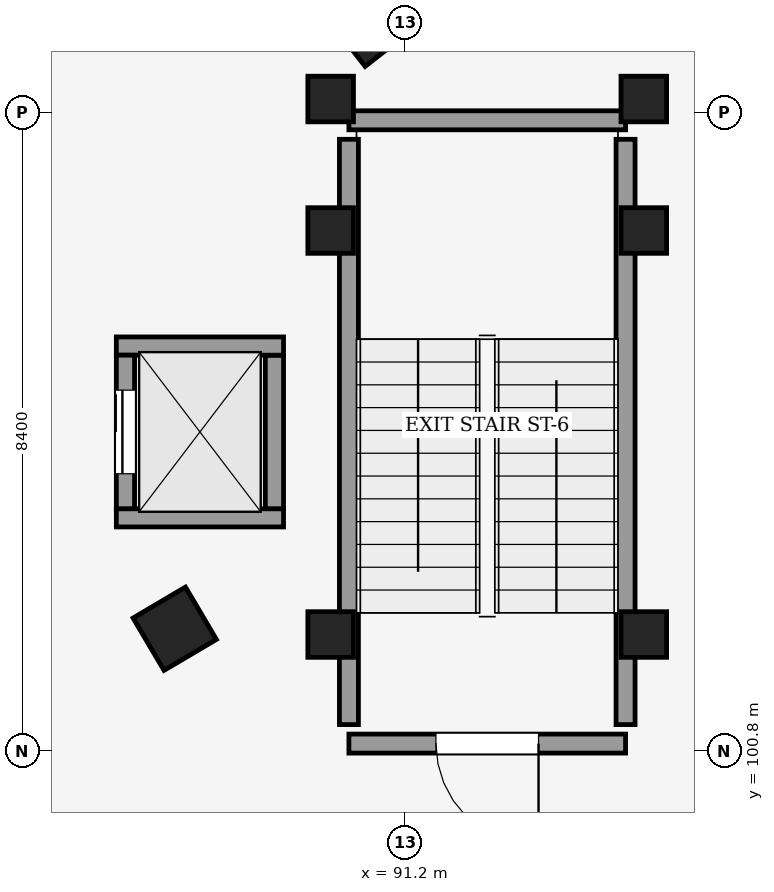
"""IFC4 building model, lengths in metres.
Left out: names, types, materials, properties, quantities, classifications, styles, units other than length and angle.
Written with IfcOpenShell. Run it as: python <this file> out.ifc"""

import sys

from ifc_helpers import new_model, si_unit, direction, frame, frame_2d, origin, origin_2d, place, context, subcontext, project, spatial, rectangle, circle, extrude, element, fill, save


model = new_model("IFC4")
c1 = context("Model", 3, precision=1e-05, world=origin(), true_north=direction((0.0, 1.0)))
c2 = subcontext(c1, "Body", "Model", "MODEL_VIEW")
j1 = project(units=[si_unit("LENGTHUNIT", "METRE"), si_unit("PLANEANGLEUNIT", "RADIAN")], contexts=[c1])
p1 = place(None, origin())
s1 = spatial("IfcSite", under=j1, at=p1, CompositionType="ELEMENT")
p2 = place(p1, origin())
s2 = spatial("IfcBuilding", under=s1, at=p2, CompositionType="ELEMENT")
p3 = place(p2, frame((0.0, 0.0, -4.2)))
s3 = spatial("IfcBuildingStorey", under=s2, at=p3, CompositionType="ELEMENT", Elevation=-4.2)
p4 = place(p3, frame((88.168, 102.411, 0.0), z_axis=(0.0, 0.0, 1.0), x_axis=(0.861008442465, 0.508590662521, 0.0)))
e1 = element("IfcColumn", 1, at=p4, inside=s3, PredefinedType="COLUMN", context=c2, shape_type="SweptSolid", body=[
    extrude(rectangle(XDim=0.8, YDim=0.8, at=origin_2d()), origin(), (0.0, 0.0, 1.0), 4.2),
])
p5 = place(p3, frame((90.738, 110.336, 0.0), z_axis=(0.0, 0.0, 1.0), x_axis=(0.78822561199, 0.615386370179, 0.0)))
e2 = element("IfcColumn", 2, at=p5, inside=s3, PredefinedType="COLUMN", context=c2, shape_type="SweptSolid", body=[
    extrude(circle(Radius=0.375, at=origin_2d()), origin(), (0.0, 0.0, 1.0), 4.2),
])
for number, where, z_axis, x_axis in (
    (3, (94.34, 102.335, 0.0), (0.0, 0.0, 1.0), (1.0, 0.0, 0.0)),
    (4, (90.22, 102.335, 0.0), (0.0, 0.0, 1.0), (1.0, 0.0, 0.0)),
    (5, (94.34, 107.65, 0.0), (0.0, 0.0, 1.0), (1.0, 0.0, 0.0)),
    (6, (90.22, 107.65, 0.0), (0.0, 0.0, 1.0), (1.0, 0.0, 0.0)),
    (7, (94.34, 109.38, 0.0), (0.0, 0.0, 1.0), (1.0, 0.0, 0.0)),
    (8, (90.22, 109.38, 0.0), (0.0, 0.0, 1.0), (1.0, 0.0, 0.0)),
):
    element("IfcColumn", number, at=place(p3, frame(where, z_axis=z_axis, x_axis=x_axis)), inside=s3, PredefinedType="COLUMN", context=c2, shape_type="SweptSolid", body=[
        extrude(rectangle(XDim=0.6, YDim=0.6, at=origin_2d()), origin(), (0.0, 0.0, 1.0), 4.2),
    ])
p6 = place(p3, frame((94.1, 100.9, 0.0), z_axis=(0.0, 0.0, 1.0), x_axis=(-1.0, 0.0, 0.0)))
e9 = element("IfcWall", 9, at=p6, inside=s3, PredefinedType="SHEAR", context=c2, shape_type="SweptSolid", body=[
    extrude(rectangle(XDim=3.64, YDim=0.25, at=frame_2d((1.82, 0.0))), origin(), (0.0, 0.0, 1.0), 4.2),
])
p7 = place(p6, frame((1.145, 0.0, 0.0)))
e10 = element("IfcOpeningElement", 10, at=p7, cuts=e9, PredefinedType="OPENING", context=c2, shape_type="SweptSolid", body=[
    extrude(rectangle(XDim=1.35, YDim=2.2, at=frame_2d((0.675, 1.1))), frame((0.0, 0.135, 0.0), z_axis=(0.0, -1.0, 0.0), x_axis=(1.0, 0.0, 0.0)), (0.0, 0.0, 1.0), 0.27),
])
p8 = place(p3, frame((90.46, 101.15, 0.0), z_axis=(0.0, 0.0, 1.0), x_axis=(0.0, 1.0, 0.0)))
e11 = element("IfcWall", 11, at=p8, inside=s3, PredefinedType="SHEAR", context=c2, shape_type="SweptSolid", body=[
    extrude(rectangle(XDim=7.7, YDim=0.25, at=frame_2d((3.85, 0.0))), origin(), (0.0, 0.0, 1.0), 4.2),
])
p9 = place(p3, frame((90.46, 109.1, 0.0), z_axis=(0.0, 0.0, 1.0), x_axis=(1.0, 0.0, 0.0)))
e12 = element("IfcWall", 12, at=p9, inside=s3, PredefinedType="SHEAR", context=c2, shape_type="SweptSolid", body=[
    extrude(rectangle(XDim=3.64, YDim=0.25, at=frame_2d((1.82, 0.0))), origin(), (0.0, 0.0, 1.0), 4.2),
])
p10 = place(p3, frame((94.1, 108.85, 0.0), z_axis=(0.0, 0.0, 1.0), x_axis=(0.0, -1.0, 0.0)))
e13 = element("IfcWall", 13, at=p10, inside=s3, PredefinedType="SHEAR", context=c2, shape_type="SweptSolid", body=[
    extrude(rectangle(XDim=7.7, YDim=0.25, at=frame_2d((3.85, 0.0))), origin(), (0.0, 0.0, 1.0), 4.2),
])
p11 = place(p3, frame((89.6, 103.87, 0.0), z_axis=(0.0, 0.0, 1.0), x_axis=(-1.0, 0.0, 0.0)))
e14 = element("IfcWall", 14, at=p11, inside=s3, PredefinedType="SHEAR", context=c2, shape_type="SweptSolid", body=[
    extrude(rectangle(XDim=2.2, YDim=0.24, at=frame_2d((1.1, 0.0))), origin(), (0.0, 0.0, 1.0), 4.2),
])
p12 = place(p3, frame((89.48, 106.01, 0.0), z_axis=(0.0, 0.0, 1.0), x_axis=(0.0, -1.0, 0.0)))
e15 = element("IfcWall", 15, at=p12, inside=s3, PredefinedType="SHEAR", context=c2, shape_type="SweptSolid", body=[
    extrude(rectangle(XDim=2.02, YDim=0.24, at=frame_2d((1.01, 0.0))), origin(), (0.0, 0.0, 1.0), 4.2),
])
p13 = place(p3, frame((87.4, 106.13, 0.0), z_axis=(0.0, 0.0, 1.0), x_axis=(1.0, 0.0, 0.0)))
e16 = element("IfcWall", 16, at=p13, inside=s3, PredefinedType="SHEAR", context=c2, shape_type="SweptSolid", body=[
    extrude(rectangle(XDim=2.2, YDim=0.24, at=frame_2d((1.1, 0.0))), origin(), (0.0, 0.0, 1.0), 4.2),
])
p14 = place(p3, frame((87.52, 103.99, 0.0), z_axis=(0.0, 0.0, 1.0), x_axis=(0.0, 1.0, 0.0)))
e17 = element("IfcWall", 17, at=p14, inside=s3, PredefinedType="SHEAR", context=c2, shape_type="SweptSolid", body=[
    extrude(rectangle(XDim=2.02, YDim=0.24, at=frame_2d((1.01, 0.0))), origin(), (0.0, 0.0, 1.0), 4.2),
])
p15 = place(p14, frame((0.46, 0.0, 0.0)))
e18 = element("IfcOpeningElement", 18, at=p15, cuts=e17, PredefinedType="OPENING", context=c2, shape_type="SweptSolid", body=[
    extrude(rectangle(XDim=1.1, YDim=2.15, at=frame_2d((0.55, 1.075))), frame((0.0, 0.13, 0.0), z_axis=(0.0, -1.0, 0.0), x_axis=(1.0, 0.0, 0.0)), (0.0, 0.0, 1.0), 0.26),
])
p16 = place(p7, origin())
e19 = element("IfcDoor", 19, at=p16, inside=s3, OperationType="SINGLE_SWING_LEFT", PredefinedType="DOOR", context=c2, shape_type="SweptSolid", body=[
    extrude(rectangle(XDim=1.35, YDim=2.2, at=frame_2d((0.675, 1.1))), frame((0.0, 0.025, 0.0), z_axis=(0.0, -1.0, 0.0), x_axis=(1.0, 0.0, 0.0)), (0.0, 0.0, 1.0), 0.05),
])
fill(e10, e19)
p17 = place(p15, origin())
e20 = element("IfcDoor", 20, at=p17, inside=s3, OperationType="SLIDING_TO_RIGHT", PredefinedType="DOOR", context=c2, shape_type="SweptSolid", body=[
    extrude(rectangle(XDim=1.1, YDim=2.15, at=frame_2d((0.55, 1.075))), frame((0.0, 0.025, 0.0), z_axis=(0.0, -1.0, 0.0), x_axis=(1.0, 0.0, 0.0)), (0.0, 0.0, 1.0), 0.05),
])
fill(e18, e20)
save(model, sys.argv[1])
